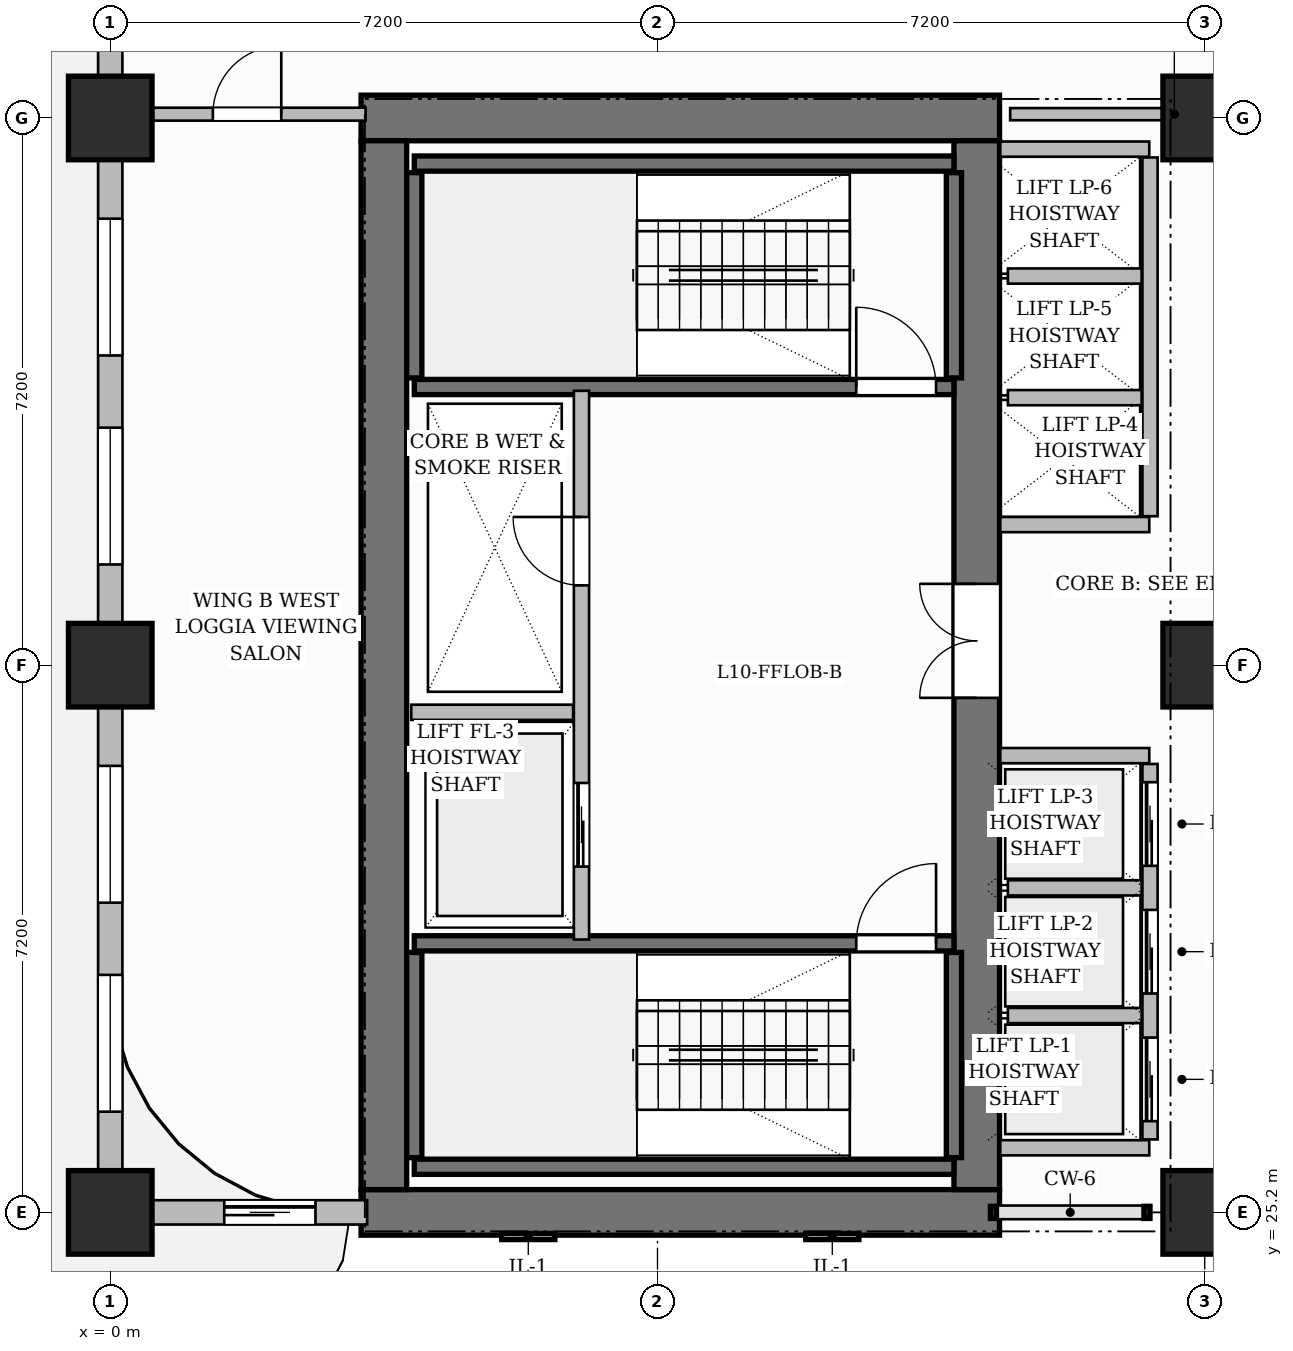
"""IFC4 building model, lengths in metres.
Left out: names, types, materials, properties, quantities, classifications, styles, units other than length and angle.
Written with IfcOpenShell. Run it as: python <this file> out.ifc"""

import sys

from ifc_helpers import new_model, si_unit, direction, frame, frame_2d, origin, origin_2d, place, context, subcontext, project, spatial, rectangle, extrude, source, transform, mapped, element, fill, save


model = new_model("IFC4")
c1 = context("Model", 3, precision=1e-05, world=origin(), true_north=direction((0.0, 1.0)))
c2 = subcontext(c1, "Body", "Model", "MODEL_VIEW")
j1 = project(units=[si_unit("LENGTHUNIT", "METRE"), si_unit("PLANEANGLEUNIT", "RADIAN")], contexts=[c1])
p1 = place(None, origin())
s1 = spatial("IfcSite", under=j1, at=p1, CompositionType="ELEMENT")
p2 = place(p1, origin())
s2 = spatial("IfcBuilding", under=s1, at=p2, CompositionType="ELEMENT")
p3 = place(p2, frame((0.0, 0.0, 47.2)))
s3 = spatial("IfcBuildingStorey", under=s2, at=p3, CompositionType="ELEMENT", Elevation=47.2)
for number, where, z_axis, x_axis in (
    (1, (3.3, 25.2, 0.0), (0.0, 0.0, 1.0), (1.0, 0.0, 0.0)),
    (2, (3.3, 39.6, 0.0), (0.0, 0.0, 1.0), (1.0, 0.0, 0.0)),
):
    element("IfcWall", number, at=place(p3, frame(where, z_axis=z_axis, x_axis=x_axis)), inside=s3, PredefinedType="SHEAR", context=c2, shape_type="SweptSolid", body=[
        extrude(rectangle(XDim=8.4, YDim=0.6, at=frame_2d((4.2, 0.0))), origin(), (0.0, 0.0, 1.0), 3.7),
    ])
p4 = place(p3, frame((3.6, 25.5, 0.0), z_axis=(0.0, 0.0, 1.0), x_axis=(0.0, 1.0, 0.0)))
e3 = element("IfcWall", 3, at=p4, inside=s3, PredefinedType="SHEAR", context=c2, shape_type="SweptSolid", body=[
    extrude(rectangle(XDim=13.8, YDim=0.6, at=frame_2d((6.9, 0.0))), origin(), (0.0, 0.0, 1.0), 3.7),
])
p5 = place(p3, frame((11.4, 25.5, 0.0), z_axis=(0.0, 0.0, 1.0), x_axis=(0.0, 1.0, 0.0)))
e4 = element("IfcWall", 4, at=p5, inside=s3, PredefinedType="SHEAR", context=c2, shape_type="SweptSolid", body=[
    extrude(rectangle(XDim=13.8, YDim=0.6, at=frame_2d((6.9, 0.0))), origin(), (0.0, 0.0, 1.0), 3.7),
])
p6 = place(p5, frame((6.47, 0.0, 0.0)))
e5 = element("IfcOpeningElement", 5, at=p6, cuts=e4, PredefinedType="OPENING", context=c2, shape_type="SweptSolid", body=[
    extrude(rectangle(XDim=1.5, YDim=2.2, at=frame_2d((0.75, 1.1))), frame((0.0, 0.31, 0.0), z_axis=(0.0, -1.0, 0.0), x_axis=(1.0, 0.0, 0.0)), (0.0, 0.0, 1.0), 0.62),
])
m1 = source(origin(), c2, "Body", "SweptSolid", [
    extrude(rectangle(XDim=1.1, YDim=1.1, at=origin_2d()), origin(), (0.0, 0.0, 1.0), 3.7),
])
for number, where, z_axis, x_axis in (
    (6, (0.0, 25.2, 0.0), (0.0, 0.0, 1.0), (1.0, 0.0, 0.0)),
    (7, (0.0, 32.4, 0.0), (0.0, 0.0, 1.0), (1.0, 0.0, 0.0)),
    (8, (0.0, 39.6, 0.0), (0.0, 0.0, 1.0), (1.0, 0.0, 0.0)),
    (9, (14.4, 25.2, 0.0), (0.0, 0.0, 1.0), (1.0, 0.0, 0.0)),
    (10, (14.4, 32.4, 0.0), (0.0, 0.0, 1.0), (1.0, 0.0, 0.0)),
    (11, (14.4, 39.6, 0.0), (0.0, 0.0, 1.0), (1.0, 0.0, 0.0)),
):
    element("IfcColumn", number, at=place(p3, frame(where, z_axis=z_axis, x_axis=x_axis)), inside=s3, PredefinedType="COLUMN", context=c2, shape_type="MappedRepresentation", body=[
        mapped(m1, transform((0.0, 0.0, 0.0), scale=1.0)),
    ])
p7 = place(p3, frame((4.0, 25.8, 0.0), z_axis=(0.0, 0.0, 1.0), x_axis=(1.0, 0.0, 0.0)))
e12 = element("IfcWall", 12, at=p7, inside=s3, PredefinedType="SHEAR", context=c2, shape_type="SweptSolid", body=[
    extrude(rectangle(XDim=7.1, YDim=0.2, at=frame_2d((3.55, 0.0))), origin(), (0.0, 0.0, 1.0), 3.7),
])
for number, where, z_axis, x_axis in (
    (13, (4.0, 25.92, 0.0), (0.0, 0.0, 1.0), (0.0, 1.0, 0.0)),
    (14, (11.1, 25.92, 0.0), (0.0, 0.0, 1.0), (0.0, 1.0, 0.0)),
):
    element("IfcWall", number, at=place(p3, frame(where, z_axis=z_axis, x_axis=x_axis)), inside=s3, PredefinedType="SHEAR", context=c2, shape_type="SweptSolid", body=[
        extrude(rectangle(XDim=2.7, YDim=0.2, at=frame_2d((1.35, 0.0))), origin(), (0.0, 0.0, 1.0), 3.7),
    ])
p8 = place(p3, frame((4.0, 28.74, 0.0), z_axis=(0.0, 0.0, 1.0), x_axis=(1.0, 0.0, 0.0)))
e15 = element("IfcWall", 15, at=p8, inside=s3, PredefinedType="SHEAR", context=c2, shape_type="SweptSolid", body=[
    extrude(rectangle(XDim=7.1, YDim=0.2, at=frame_2d((3.55, 0.0))), origin(), (0.0, 0.0, 1.0), 3.7),
])
p9 = place(p8, frame((5.815, 0.0, 0.0)))
e16 = element("IfcOpeningElement", 16, at=p9, cuts=e15, PredefinedType="OPENING", context=c2, shape_type="SweptSolid", body=[
    extrude(rectangle(XDim=1.05, YDim=2.2, at=frame_2d((0.525, 1.1))), frame((0.0, 0.11, 0.0), z_axis=(0.0, -1.0, 0.0), x_axis=(1.0, 0.0, 0.0)), (0.0, 0.0, 1.0), 0.22),
])
p10 = place(p3, frame((4.0, 39.0, 0.0), z_axis=(0.0, 0.0, 1.0), x_axis=(1.0, 0.0, 0.0)))
e17 = element("IfcWall", 17, at=p10, inside=s3, PredefinedType="SHEAR", context=c2, shape_type="SweptSolid", body=[
    extrude(rectangle(XDim=7.1, YDim=0.2, at=frame_2d((3.55, 0.0))), origin(), (0.0, 0.0, 1.0), 3.7),
])
for number, where, z_axis, x_axis in (
    (18, (4.0, 36.18, 0.0), (0.0, 0.0, 1.0), (0.0, 1.0, 0.0)),
    (19, (11.1, 36.18, 0.0), (0.0, 0.0, 1.0), (0.0, 1.0, 0.0)),
):
    element("IfcWall", number, at=place(p3, frame(where, z_axis=z_axis, x_axis=x_axis)), inside=s3, PredefinedType="SHEAR", context=c2, shape_type="SweptSolid", body=[
        extrude(rectangle(XDim=2.7, YDim=0.2, at=frame_2d((1.35, 0.0))), origin(), (0.0, 0.0, 1.0), 3.7),
    ])
p11 = place(p3, frame((4.0, 36.06, 0.0), z_axis=(0.0, 0.0, 1.0), x_axis=(1.0, 0.0, 0.0)))
e20 = element("IfcWall", 20, at=p11, inside=s3, PredefinedType="SHEAR", context=c2, shape_type="SweptSolid", body=[
    extrude(rectangle(XDim=7.1, YDim=0.2, at=frame_2d((3.55, 0.0))), origin(), (0.0, 0.0, 1.0), 3.7),
])
p12 = place(p11, frame((5.815, 0.0, 0.0)))
e21 = element("IfcOpeningElement", 21, at=p12, cuts=e20, PredefinedType="OPENING", context=c2, shape_type="SweptSolid", body=[
    extrude(rectangle(XDim=1.05, YDim=2.2, at=frame_2d((0.525, 1.1))), frame((0.0, 0.11, 0.0), z_axis=(0.0, -1.0, 0.0), x_axis=(1.0, 0.0, 0.0)), (0.0, 0.0, 1.0), 0.22),
])
p13 = place(p3, frame((6.2, 28.79, 0.0), z_axis=(0.0, 0.0, 1.0), x_axis=(0.0, 1.0, 0.0)))
e22 = element("IfcWall", 22, at=p13, inside=s3, PredefinedType="PARTITIONING", context=c2, shape_type="SweptSolid", body=[
    extrude(rectangle(XDim=7.22, YDim=0.2, at=frame_2d((3.61, 0.0))), origin(), (0.0, 0.0, 1.0), 3.45),
])
p14 = place(p13, frame((4.66, 0.0, 0.0)))
e23 = element("IfcOpeningElement", 23, at=p14, cuts=e22, PredefinedType="OPENING", context=c2, shape_type="SweptSolid", body=[
    extrude(rectangle(XDim=0.9, YDim=2.1, at=frame_2d((0.45, 1.05))), frame((0.0, 0.11, 0.0), z_axis=(0.0, -1.0, 0.0), x_axis=(1.0, 0.0, 0.0)), (0.0, 0.0, 1.0), 0.22),
])
p15 = place(p13, frame((0.96, 0.0, 0.0)))
e24 = element("IfcOpeningElement", 24, at=p15, cuts=e22, PredefinedType="OPENING", context=c2, shape_type="SweptSolid", body=[
    extrude(rectangle(XDim=1.1, YDim=2.2, at=frame_2d((0.55, 1.1))), frame((0.0, 0.11, 0.0), z_axis=(0.0, -1.0, 0.0), x_axis=(1.0, 0.0, 0.0)), (0.0, 0.0, 1.0), 0.22),
])
p16 = place(p3, frame((3.96, 31.78, 0.0), z_axis=(0.0, 0.0, 1.0), x_axis=(1.0, 0.0, 0.0)))
e25 = element("IfcWall", 25, at=p16, inside=s3, PredefinedType="PARTITIONING", context=c2, shape_type="SweptSolid", body=[
    extrude(rectangle(XDim=2.13, YDim=0.2, at=frame_2d((1.065, 0.0))), origin(), (0.0, 0.0, 1.0), 3.45),
])
for number, where, z_axis, x_axis in (
    (26, (11.71, 26.05, 0.0), (0.0, 0.0, 1.0), (1.0, 0.0, 0.0)),
    (27, (11.71, 31.21, 0.0), (0.0, 0.0, 1.0), (1.0, 0.0, 0.0)),
):
    element("IfcWall", number, at=place(p3, frame(where, z_axis=z_axis, x_axis=x_axis)), inside=s3, PredefinedType="PARTITIONING", context=c2, shape_type="SweptSolid", body=[
        extrude(rectangle(XDim=1.96, YDim=0.2, at=frame_2d((0.98, 0.0))), origin(), (0.0, 0.0, 1.0), 3.45),
    ])
p17 = place(p3, frame((13.68, 26.16, 0.0), z_axis=(0.0, 0.0, 1.0), x_axis=(0.0, 1.0, 0.0)))
e28 = element("IfcWall", 28, at=p17, inside=s3, PredefinedType="PARTITIONING", context=c2, shape_type="SweptSolid", body=[
    extrude(rectangle(XDim=4.94, YDim=0.2, at=frame_2d((2.47, 0.0))), origin(), (0.0, 0.0, 1.0), 3.45),
])
p18 = place(p17, frame((0.24, 0.0, 0.0)))
e29 = element("IfcOpeningElement", 29, at=p18, cuts=e28, PredefinedType="OPENING", context=c2, shape_type="SweptSolid", body=[
    extrude(rectangle(XDim=1.1, YDim=2.2, at=frame_2d((0.55, 1.1))), frame((0.0, 0.11, 0.0), z_axis=(0.0, -1.0, 0.0), x_axis=(1.0, 0.0, 0.0)), (0.0, 0.0, 1.0), 0.22),
])
p19 = place(p17, frame((1.92, 0.0, 0.0)))
e30 = element("IfcOpeningElement", 30, at=p19, cuts=e28, PredefinedType="OPENING", context=c2, shape_type="SweptSolid", body=[
    extrude(rectangle(XDim=1.1, YDim=2.2, at=frame_2d((0.55, 1.1))), frame((0.0, 0.11, 0.0), z_axis=(0.0, -1.0, 0.0), x_axis=(1.0, 0.0, 0.0)), (0.0, 0.0, 1.0), 0.22),
])
p20 = place(p17, frame((3.6, 0.0, 0.0)))
e31 = element("IfcOpeningElement", 31, at=p20, cuts=e28, PredefinedType="OPENING", context=c2, shape_type="SweptSolid", body=[
    extrude(rectangle(XDim=1.1, YDim=2.2, at=frame_2d((0.55, 1.1))), frame((0.0, 0.11, 0.0), z_axis=(0.0, -1.0, 0.0), x_axis=(1.0, 0.0, 0.0)), (0.0, 0.0, 1.0), 0.22),
])
for number, where, z_axis, x_axis in (
    (32, (11.81, 27.79, 0.0), (0.0, 0.0, 1.0), (1.0, 0.0, 0.0)),
    (33, (11.81, 29.47, 0.0), (0.0, 0.0, 1.0), (1.0, 0.0, 0.0)),
):
    element("IfcWall", number, at=place(p3, frame(where, z_axis=z_axis, x_axis=x_axis)), inside=s3, PredefinedType="PARTITIONING", context=c2, shape_type="SweptSolid", body=[
        extrude(rectangle(XDim=1.76, YDim=0.2, at=frame_2d((0.88, 0.0))), origin(), (0.0, 0.0, 1.0), 3.45),
    ])
for number, where, z_axis, x_axis in (
    (34, (11.71, 34.25, 0.0), (0.0, 0.0, 1.0), (1.0, 0.0, 0.0)),
    (35, (11.71, 39.19, 0.0), (0.0, 0.0, 1.0), (1.0, 0.0, 0.0)),
):
    element("IfcWall", number, at=place(p3, frame(where, z_axis=z_axis, x_axis=x_axis)), inside=s3, PredefinedType="PARTITIONING", context=c2, shape_type="SweptSolid", body=[
        extrude(rectangle(XDim=1.96, YDim=0.2, at=frame_2d((0.98, 0.0))), origin(), (0.0, 0.0, 1.0), 3.45),
    ])
p21 = place(p3, frame((13.68, 34.36, 0.0), z_axis=(0.0, 0.0, 1.0), x_axis=(0.0, 1.0, 0.0)))
e36 = element("IfcWall", 36, at=p21, inside=s3, PredefinedType="PARTITIONING", context=c2, shape_type="SweptSolid", body=[
    extrude(rectangle(XDim=4.72, YDim=0.2, at=frame_2d((2.36, 0.0))), origin(), (0.0, 0.0, 1.0), 3.45),
])
for number, where, z_axis, x_axis in (
    (37, (11.81, 35.92, 0.0), (0.0, 0.0, 1.0), (1.0, 0.0, 0.0)),
    (38, (11.81, 37.52, 0.0), (0.0, 0.0, 1.0), (1.0, 0.0, 0.0)),
):
    element("IfcWall", number, at=place(p3, frame(where, z_axis=z_axis, x_axis=x_axis)), inside=s3, PredefinedType="PARTITIONING", context=c2, shape_type="SweptSolid", body=[
        extrude(rectangle(XDim=1.76, YDim=0.2, at=frame_2d((0.88, 0.0))), origin(), (0.0, 0.0, 1.0), 3.45),
    ])
p22 = place(p3, frame((11.84, 39.65, 0.0), z_axis=(0.0, 0.0, 1.0), x_axis=(1.0, 0.0, 0.0)))
e39 = element("IfcWall", 39, at=p22, inside=s3, PredefinedType="PARTITIONING", context=c2, shape_type="SweptSolid", body=[
    extrude(rectangle(XDim=4.32, YDim=0.16, at=frame_2d((2.16, 0.0))), origin(), (0.0, 0.0, 1.0), 2.885),
])
p23 = place(p3, frame((0.24, 39.65, 0.0), z_axis=(0.0, 0.0, 1.0), x_axis=(1.0, 0.0, 0.0)))
e40 = element("IfcWall", 40, at=p23, inside=s3, PredefinedType="PARTITIONING", context=c2, shape_type="SweptSolid", body=[
    extrude(rectangle(XDim=3.12, YDim=0.17, at=frame_2d((1.56, 0.0))), origin(), (0.0, 0.0, 1.0), 3.45),
])
p24 = place(p23, frame((1.11, 0.0, 0.0)))
e41 = element("IfcOpeningElement", 41, at=p24, cuts=e40, PredefinedType="OPENING", context=c2, shape_type="SweptSolid", body=[
    extrude(rectangle(XDim=0.9, YDim=2.15, at=frame_2d((0.45, 1.075))), frame((0.0, 0.095, 0.0), z_axis=(0.0, -1.0, 0.0), x_axis=(1.0, 0.0, 0.0)), (0.0, 0.0, 1.0), 0.19),
])
p25 = place(p3, frame((0.0, 25.2, 0.0), z_axis=(0.0, 0.0, 1.0), x_axis=(1.0, 0.0, 0.0)))
e42 = element("IfcWall", 42, at=p25, inside=s3, PredefinedType="SOLIDWALL", context=c2, shape_type="SweptSolid", body=[
    extrude(rectangle(XDim=3.38, YDim=0.32, at=frame_2d((1.69, 0.0))), origin(), (0.0, 0.0, 1.0), 3.45),
])
p26 = place(p25, frame((1.5, 0.0, 0.0)))
e43 = element("IfcOpeningElement", 43, at=p26, cuts=e42, PredefinedType="OPENING", context=c2, shape_type="SweptSolid", body=[
    extrude(rectangle(XDim=1.2, YDim=2.2, at=frame_2d((0.6, 1.1))), frame((0.0, 0.17, 0.0), z_axis=(0.0, -1.0, 0.0), x_axis=(1.0, 0.0, 0.0)), (0.0, 0.0, 1.0), 0.34),
])
p27 = place(p3, frame((0.0, 25.25, 0.0), z_axis=(0.0, 0.0, 1.0), x_axis=(0.0, 1.0, 0.0)))
e44 = element("IfcWall", 44, at=p27, inside=s3, PredefinedType="SOLIDWALL", context=c2, shape_type="SweptSolid", body=[
    extrude(rectangle(XDim=21.5, YDim=0.32, at=frame_2d((10.75, 0.0))), origin(), (0.0, 0.0, 1.0), 2.885),
])
p28 = place(p27, frame((1.275, 0.0, 0.8)))
e45 = element("IfcOpeningElement", 45, at=p28, cuts=e44, PredefinedType="OPENING", context=c2, shape_type="SweptSolid", body=[
    extrude(rectangle(XDim=1.8, YDim=1.85, at=frame_2d((0.9, 0.925))), frame((0.0, 0.17, 0.0), z_axis=(0.0, -1.0, 0.0), x_axis=(1.0, 0.0, 0.0)), (0.0, 0.0, 1.0), 0.34),
])
p29 = place(p27, frame((4.025, 0.0, 0.8)))
e46 = element("IfcOpeningElement", 46, at=p29, cuts=e44, PredefinedType="OPENING", context=c2, shape_type="SweptSolid", body=[
    extrude(rectangle(XDim=1.8, YDim=1.85, at=frame_2d((0.9, 0.925))), frame((0.0, 0.17, 0.0), z_axis=(0.0, -1.0, 0.0), x_axis=(1.0, 0.0, 0.0)), (0.0, 0.0, 1.0), 0.34),
])
p30 = place(p27, frame((8.475, 0.0, 0.8)))
e47 = element("IfcOpeningElement", 47, at=p30, cuts=e44, PredefinedType="OPENING", context=c2, shape_type="SweptSolid", body=[
    extrude(rectangle(XDim=1.8, YDim=1.85, at=frame_2d((0.9, 0.925))), frame((0.0, 0.17, 0.0), z_axis=(0.0, -1.0, 0.0), x_axis=(1.0, 0.0, 0.0)), (0.0, 0.0, 1.0), 0.34),
])
p31 = place(p27, frame((11.225, 0.0, 0.8)))
e48 = element("IfcOpeningElement", 48, at=p31, cuts=e44, PredefinedType="OPENING", context=c2, shape_type="SweptSolid", body=[
    extrude(rectangle(XDim=1.8, YDim=1.85, at=frame_2d((0.9, 0.925))), frame((0.0, 0.17, 0.0), z_axis=(0.0, -1.0, 0.0), x_axis=(1.0, 0.0, 0.0)), (0.0, 0.0, 1.0), 0.34),
])
p32 = place(p27, frame((15.447, 0.0, 0.8)))
e49 = element("IfcOpeningElement", 49, at=p32, cuts=e44, PredefinedType="OPENING", context=c2, shape_type="SweptSolid", body=[
    extrude(rectangle(XDim=1.4, YDim=1.85, at=frame_2d((0.7, 0.925))), frame((0.0, 0.17, 0.0), z_axis=(0.0, -1.0, 0.0), x_axis=(1.0, 0.0, 0.0)), (0.0, 0.0, 1.0), 0.34),
])
p33 = place(p27, frame((18.053, 0.0, 0.8)))
e50 = element("IfcOpeningElement", 50, at=p33, cuts=e44, PredefinedType="OPENING", context=c2, shape_type="SweptSolid", body=[
    extrude(rectangle(XDim=1.8, YDim=1.85, at=frame_2d((0.9, 0.925))), frame((0.0, 0.17, 0.0), z_axis=(0.0, -1.0, 0.0), x_axis=(1.0, 0.0, 0.0)), (0.0, 0.0, 1.0), 0.34),
])
m2 = source(origin(), c2, "Body", "SweptSolid", [
    extrude(rectangle(XDim=1.05, YDim=2.2, at=frame_2d((0.525, 1.1))), frame((0.0, 0.025, 0.0), z_axis=(0.0, -1.0, 0.0), x_axis=(1.0, 0.0, 0.0)), (0.0, 0.0, 1.0), 0.05),
])
p34 = place(p9, origin())
e51 = element("IfcDoor", 51, at=p34, inside=s3, OperationType="SINGLE_SWING_RIGHT", PredefinedType="DOOR", context=c2, shape_type="MappedRepresentation", body=[
    mapped(m2, transform((0.0, 0.0, 0.0), scale=1.0)),
])
fill(e16, e51)
p35 = place(p12, origin())
e52 = element("IfcDoor", 52, at=p35, inside=s3, OperationType="SINGLE_SWING_LEFT", PredefinedType="DOOR", context=c2, shape_type="MappedRepresentation", body=[
    mapped(m2, transform((0.0, 0.0, 0.0), scale=1.0)),
])
fill(e21, e52)
m3 = source(origin(), c2, "Body", "SweptSolid", [
    extrude(rectangle(XDim=0.9, YDim=2.1, at=frame_2d((0.45, 1.05))), frame((0.0, 0.025, 0.0), z_axis=(0.0, -1.0, 0.0), x_axis=(1.0, 0.0, 0.0)), (0.0, 0.0, 1.0), 0.05),
])
p36 = place(p14, origin())
e53 = element("IfcDoor", 53, at=p36, inside=s3, OperationType="SINGLE_SWING_RIGHT", PredefinedType="DOOR", context=c2, shape_type="MappedRepresentation", body=[
    mapped(m3, transform((0.0, 0.0, 0.0), scale=1.0)),
])
fill(e23, e53)
m4 = source(origin(), c2, "Body", "SweptSolid", [
    extrude(rectangle(XDim=1.5, YDim=2.2, at=frame_2d((0.75, 1.1))), frame((0.0, 0.025, 0.0), z_axis=(0.0, -1.0, 0.0), x_axis=(1.0, 0.0, 0.0)), (0.0, 0.0, 1.0), 0.05),
])
p37 = place(p6, origin())
e54 = element("IfcDoor", 54, at=p37, inside=s3, OperationType="DOUBLE_DOOR_SINGLE_SWING", PredefinedType="DOOR", context=c2, shape_type="MappedRepresentation", body=[
    mapped(m4, transform((0.0, 0.0, 0.0), scale=1.0)),
])
fill(e5, e54)
m5 = source(origin(), c2, "Body", "SweptSolid", [
    extrude(rectangle(XDim=0.9, YDim=2.15, at=frame_2d((0.45, 1.075))), frame((0.0, 0.025, 0.0), z_axis=(0.0, -1.0, 0.0), x_axis=(1.0, 0.0, 0.0)), (0.0, 0.0, 1.0), 0.05),
])
p38 = place(p24, origin())
e55 = element("IfcDoor", 55, at=p38, inside=s3, OperationType="SINGLE_SWING_RIGHT", PredefinedType="DOOR", context=c2, shape_type="MappedRepresentation", body=[
    mapped(m5, transform((0.0, 0.0, 0.0), scale=1.0)),
])
fill(e41, e55)
m6 = source(origin(), c2, "Body", "SweptSolid", [
    extrude(rectangle(XDim=1.1, YDim=2.2, at=frame_2d((0.55, 1.1))), frame((0.0, 0.025, 0.0), z_axis=(0.0, -1.0, 0.0), x_axis=(1.0, 0.0, 0.0)), (0.0, 0.0, 1.0), 0.05),
])
p39 = place(p15, origin())
e56 = element("IfcDoor", 56, at=p39, inside=s3, OperationType="SLIDING_TO_LEFT", PredefinedType="DOOR", context=c2, shape_type="MappedRepresentation", body=[
    mapped(m6, transform((0.0, 0.0, 0.0), scale=1.0)),
])
fill(e24, e56)
p40 = place(p18, origin())
e57 = element("IfcDoor", 57, at=p40, inside=s3, OperationType="SLIDING_TO_LEFT", PredefinedType="DOOR", context=c2, shape_type="MappedRepresentation", body=[
    mapped(m6, transform((0.0, 0.0, 0.0), scale=1.0)),
])
fill(e29, e57)
p41 = place(p19, origin())
e58 = element("IfcDoor", 58, at=p41, inside=s3, OperationType="SLIDING_TO_LEFT", PredefinedType="DOOR", context=c2, shape_type="MappedRepresentation", body=[
    mapped(m6, transform((0.0, 0.0, 0.0), scale=1.0)),
])
fill(e30, e58)
p42 = place(p20, origin())
e59 = element("IfcDoor", 59, at=p42, inside=s3, OperationType="SLIDING_TO_LEFT", PredefinedType="DOOR", context=c2, shape_type="MappedRepresentation", body=[
    mapped(m6, transform((0.0, 0.0, 0.0), scale=1.0)),
])
fill(e31, e59)
m7 = source(origin(), c2, "Body", "SweptSolid", [
    extrude(rectangle(XDim=1.2, YDim=2.2, at=frame_2d((0.6, 1.1))), frame((0.0, 0.025, 0.0), z_axis=(0.0, -1.0, 0.0), x_axis=(1.0, 0.0, 0.0)), (0.0, 0.0, 1.0), 0.05),
])
p43 = place(p26, origin())
e60 = element("IfcDoor", 60, at=p43, inside=s3, OperationType="SLIDING_TO_LEFT", PredefinedType="DOOR", context=c2, shape_type="MappedRepresentation", body=[
    mapped(m7, transform((0.0, 0.0, 0.0), scale=1.0)),
])
fill(e43, e60)
m8 = source(origin(), c2, "Body", "SweptSolid", [
    extrude(rectangle(XDim=1.8, YDim=1.85, at=frame_2d((0.9, 0.925))), frame((0.0, 0.03, 0.0), z_axis=(0.0, -1.0, 0.0), x_axis=(1.0, 0.0, 0.0)), (0.0, 0.0, 1.0), 0.06),
])
p44 = place(p28, origin())
e61 = element("IfcWindow", 61, at=p44, inside=s3, PartitioningType="DOUBLE_PANEL_VERTICAL", PredefinedType="WINDOW", context=c2, shape_type="MappedRepresentation", body=[
    mapped(m8, transform((0.0, 0.0, 0.0), scale=1.0)),
])
fill(e45, e61)
p45 = place(p29, origin())
e62 = element("IfcWindow", 62, at=p45, inside=s3, PartitioningType="DOUBLE_PANEL_VERTICAL", PredefinedType="WINDOW", context=c2, shape_type="MappedRepresentation", body=[
    mapped(m8, transform((0.0, 0.0, 0.0), scale=1.0)),
])
fill(e46, e62)
p46 = place(p30, origin())
e63 = element("IfcWindow", 63, at=p46, inside=s3, PartitioningType="DOUBLE_PANEL_VERTICAL", PredefinedType="WINDOW", context=c2, shape_type="MappedRepresentation", body=[
    mapped(m8, transform((0.0, 0.0, 0.0), scale=1.0)),
])
fill(e47, e63)
p47 = place(p31, origin())
e64 = element("IfcWindow", 64, at=p47, inside=s3, PartitioningType="DOUBLE_PANEL_VERTICAL", PredefinedType="WINDOW", context=c2, shape_type="MappedRepresentation", body=[
    mapped(m8, transform((0.0, 0.0, 0.0), scale=1.0)),
])
fill(e48, e64)
save(model, sys.argv[1])
